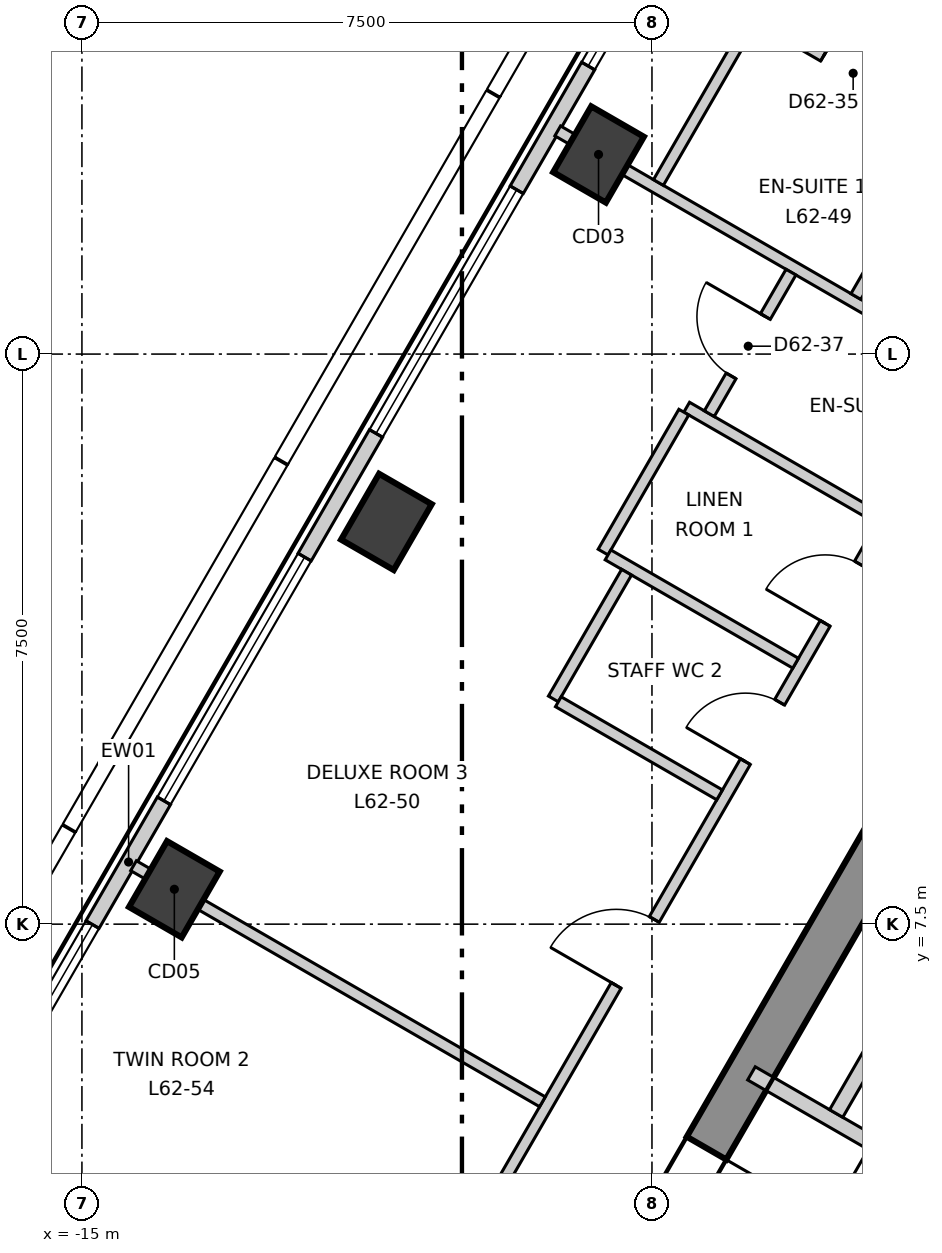
"""IFC4 building model, lengths in metres.
Left out: names, types, materials, properties, quantities, classifications, styles, units other than length and angle.
Written with IfcOpenShell. Run it as: python <this file> out.ifc"""

import sys

from ifc_helpers import new_model, si_unit, direction, frame, frame_2d, origin, origin_2d, place, context, subcontext, project, spatial, polyline, rectangle, outline, extrude, element, fill, save


model = new_model("IFC4")
c1 = context("Model", 3, precision=1e-05, world=origin(), true_north=direction((0.0, 1.0)))
c2 = subcontext(c1, "Body", "Model", "MODEL_VIEW")
j1 = project(units=[si_unit("LENGTHUNIT", "METRE"), si_unit("PLANEANGLEUNIT", "RADIAN")], contexts=[c1])
p1 = place(None, origin())
s1 = spatial("IfcSite", under=j1, at=p1, CompositionType="ELEMENT")
p2 = place(p1, origin())
s2 = spatial("IfcBuilding", under=s1, at=p2, CompositionType="ELEMENT")
p3 = place(p2, frame((0.0, 0.0, 268.3)))
s3 = spatial("IfcBuildingStorey", under=s2, at=p3, CompositionType="ELEMENT", Elevation=268.3)
p4 = place(p3, frame((-1.732, 13.3, -0.3), z_axis=(0.0, 0.0, 1.0), x_axis=(-0.500000539815, -0.866025092122, 0.0)))
e1 = element("IfcWall", 1, at=p4, inside=s3, PredefinedType="SHEAR", context=c2, shape_type="SweptSolid", body=[
    extrude(outline(polyline([(-0.173, -0.3), (1.795, -0.3), (3.763, -0.3), (5.732, -0.3), (7.7, -0.3), (9.668, -0.301), (11.637, -0.301), (13.605, -0.301), (15.573, -0.301), (17.542, -0.301), (19.51, -0.301), (21.478, -0.301), (21.131, 0.3), (19.226, 0.3), (17.321, 0.3), (15.415, 0.3), (13.51, 0.3), (11.605, 0.3), (9.699, 0.3), (7.794, 0.3), (5.889, 0.3), (3.984, 0.3), (2.078, 0.3), (0.173, 0.3), (-0.173, -0.3)])), origin(), (0.0, 0.0, 1.0), 3.6),
])
p5 = place(p4, frame((10.102, 0.0, 0.3)))
e2 = element("IfcOpeningElement", 2, at=p5, cuts=e1, PredefinedType="OPENING", context=c2, shape_type="SweptSolid", body=[
    extrude(rectangle(XDim=1.1, YDim=2.1, at=frame_2d((0.55, 1.05))), frame((0.0, 0.31, 0.0), z_axis=(0.0, -1.0, 0.0), x_axis=(1.0, 0.0, 0.0)), (0.0, 0.0, 1.0), 0.621),
])
p6 = place(p4, frame((16.378, 0.0, 0.3)))
e3 = element("IfcOpeningElement", 3, at=p6, cuts=e1, PredefinedType="OPENING", context=c2, shape_type="SweptSolid", body=[
    extrude(rectangle(XDim=0.9, YDim=2.1, at=frame_2d((0.45, 1.05))), frame((0.0, 0.31, 0.0), z_axis=(0.0, -1.0, 0.0), x_axis=(1.0, 0.0, 0.0)), (0.0, 0.0, 1.0), 0.621),
])
p7 = place(p4, frame((4.026, 0.0, 0.3)))
e4 = element("IfcOpeningElement", 4, at=p7, cuts=e1, PredefinedType="OPENING", context=c2, shape_type="SweptSolid", body=[
    extrude(rectangle(XDim=0.9, YDim=2.1, at=frame_2d((0.45, 1.05))), frame((0.0, 0.31, 0.0), z_axis=(0.0, -1.0, 0.0), x_axis=(1.0, 0.0, 0.0)), (0.0, 0.0, 1.0), 0.621),
])
for number, where, z_axis, x_axis in (
    (5, (-8.203, 17.626, -0.3), (0.0, 0.0, 1.0), (0.5, 0.866, 0.0)),
    (6, (-10.994, 12.792, -0.3), (0.0, 0.0, 1.0), (0.5, 0.866, 0.0)),
    (7, (-13.784, 7.959, -0.3), (0.0, 0.0, 1.0), (0.5, 0.866, 0.0)),
):
    element("IfcColumn", number, at=place(p3, frame(where, z_axis=z_axis, x_axis=x_axis)), inside=s3, PredefinedType="COLUMN", context=c2, shape_type="SweptSolid", body=[
        extrude(rectangle(XDim=1.0, YDim=0.8, at=origin_2d()), origin(), (0.0, 0.0, 1.0), 3.6),
    ])
p8 = place(p3, frame((-2.577, 28.771, 0.0), z_axis=(0.0, 0.0, 1.0), x_axis=(-0.49999909388, -0.866025926932, 0.0)))
e8 = element("IfcWall", 8, at=p8, inside=s3, PredefinedType="ELEMENTEDWALL", context=c2, shape_type="SweptSolid", body=[
    extrude(rectangle(XDim=47.236, YDim=0.2, at=frame_2d((23.618, 0.0))), origin(), (0.0, 0.0, 1.0), 3.3),
])
p9 = place(p8, frame((2.243, 0.0, 0.9)))
e9 = element("IfcOpeningElement", 9, at=p9, cuts=e8, PredefinedType="OPENING", context=c2, shape_type="SweptSolid", body=[
    extrude(rectangle(XDim=3.7, YDim=2.2, at=frame_2d((1.85, 1.1))), frame((0.0, 0.11, 0.0), z_axis=(0.0, -1.0, 0.0), x_axis=(1.0, 0.0, 0.0)), (0.0, 0.0, 1.0), 0.22),
])
p10 = place(p8, frame((7.824, 0.0, 0.9)))
e10 = element("IfcOpeningElement", 10, at=p10, cuts=e8, PredefinedType="OPENING", context=c2, shape_type="SweptSolid", body=[
    extrude(rectangle(XDim=3.7, YDim=2.2, at=frame_2d((1.85, 1.1))), frame((0.0, 0.11, 0.0), z_axis=(0.0, -1.0, 0.0), x_axis=(1.0, 0.0, 0.0)), (0.0, 0.0, 1.0), 0.22),
])
p11 = place(p8, frame((13.406, 0.0, 0.9)))
e11 = element("IfcOpeningElement", 11, at=p11, cuts=e8, PredefinedType="OPENING", context=c2, shape_type="SweptSolid", body=[
    extrude(rectangle(XDim=3.7, YDim=2.2, at=frame_2d((1.85, 1.1))), frame((0.0, 0.11, 0.0), z_axis=(0.0, -1.0, 0.0), x_axis=(1.0, 0.0, 0.0)), (0.0, 0.0, 1.0), 0.22),
])
p12 = place(p8, frame((18.987, 0.0, 0.9)))
e12 = element("IfcOpeningElement", 12, at=p12, cuts=e8, PredefinedType="OPENING", context=c2, shape_type="SweptSolid", body=[
    extrude(rectangle(XDim=3.7, YDim=2.2, at=frame_2d((1.85, 1.1))), frame((0.0, 0.11, 0.0), z_axis=(0.0, -1.0, 0.0), x_axis=(1.0, 0.0, 0.0)), (0.0, 0.0, 1.0), 0.22),
])
p13 = place(p8, frame((24.569, 0.0, 0.9)))
e13 = element("IfcOpeningElement", 13, at=p13, cuts=e8, PredefinedType="OPENING", context=c2, shape_type="SweptSolid", body=[
    extrude(rectangle(XDim=3.7, YDim=2.2, at=frame_2d((1.85, 1.1))), frame((0.0, 0.11, 0.0), z_axis=(0.0, -1.0, 0.0), x_axis=(1.0, 0.0, 0.0)), (0.0, 0.0, 1.0), 0.22),
])
p14 = place(p8, frame((30.15, 0.0, 0.9)))
e14 = element("IfcOpeningElement", 14, at=p14, cuts=e8, PredefinedType="OPENING", context=c2, shape_type="SweptSolid", body=[
    extrude(rectangle(XDim=3.7, YDim=2.2, at=frame_2d((1.85, 1.1))), frame((0.0, 0.11, 0.0), z_axis=(0.0, -1.0, 0.0), x_axis=(1.0, 0.0, 0.0)), (0.0, 0.0, 1.0), 0.22),
])
p15 = place(p8, frame((35.731, 0.0, 0.9)))
e15 = element("IfcOpeningElement", 15, at=p15, cuts=e8, PredefinedType="OPENING", context=c2, shape_type="SweptSolid", body=[
    extrude(rectangle(XDim=3.7, YDim=2.2, at=frame_2d((1.85, 1.1))), frame((0.0, 0.11, 0.0), z_axis=(0.0, -1.0, 0.0), x_axis=(1.0, 0.0, 0.0)), (0.0, 0.0, 1.0), 0.22),
])
p16 = place(p8, frame((41.313, 0.0, 0.9)))
e16 = element("IfcOpeningElement", 16, at=p16, cuts=e8, PredefinedType="OPENING", context=c2, shape_type="SweptSolid", body=[
    extrude(rectangle(XDim=3.7, YDim=2.2, at=frame_2d((1.85, 1.1))), frame((0.0, 0.11, 0.0), z_axis=(0.0, -1.0, 0.0), x_axis=(1.0, 0.0, 0.0)), (0.0, 0.0, 1.0), 0.22),
])
p17 = place(p3, frame((-17.678, -10.12, 0.0), z_axis=(0.0, 0.0, 1.0), x_axis=(0.49998824015, 0.86603219323, 0.0)))
e17 = element("IfcWall", 17, at=p17, inside=s3, PredefinedType="PARTITIONING", context=c2, shape_type="SweptSolid", body=[
    extrude(rectangle(XDim=35.357, YDim=0.15, at=frame_2d((17.678, 0.0))), origin(), (0.0, 0.0, 1.0), 3.3),
])
p18 = place(p17, frame((31.607, 0.0, 0.0)))
e18 = element("IfcOpeningElement", 18, at=p18, cuts=e17, PredefinedType="OPENING", context=c2, shape_type="SweptSolid", body=[
    extrude(rectangle(XDim=1.0, YDim=2.1, at=frame_2d((0.5, 1.05))), frame((0.0, 0.085, 0.0), z_axis=(0.0, -1.0, 0.0), x_axis=(1.0, 0.0, 0.0)), (0.0, 0.0, 1.0), 0.17),
])
p19 = place(p17, frame((19.416, 0.0, 0.0)))
e19 = element("IfcOpeningElement", 19, at=p19, cuts=e17, PredefinedType="OPENING", context=c2, shape_type="SweptSolid", body=[
    extrude(rectangle(XDim=1.0, YDim=2.1, at=frame_2d((0.5, 1.05))), frame((0.0, 0.085, 0.0), z_axis=(0.0, -1.0, 0.0), x_axis=(1.0, 0.0, 0.0)), (0.0, 0.0, 1.0), 0.17),
])
p20 = place(p17, frame((24.916, 0.0, 0.0)))
e20 = element("IfcOpeningElement", 20, at=p20, cuts=e17, PredefinedType="OPENING", context=c2, shape_type="SweptSolid", body=[
    extrude(rectangle(XDim=0.9, YDim=2.1, at=frame_2d((0.45, 1.05))), frame((0.0, 0.085, 0.0), z_axis=(0.0, -1.0, 0.0), x_axis=(1.0, 0.0, 0.0)), (0.0, 0.0, 1.0), 0.17),
])
p21 = place(p17, frame((22.816, 0.0, 0.0)))
e21 = element("IfcOpeningElement", 21, at=p21, cuts=e17, PredefinedType="OPENING", context=c2, shape_type="SweptSolid", body=[
    extrude(rectangle(XDim=0.9, YDim=2.1, at=frame_2d((0.45, 1.05))), frame((0.0, 0.085, 0.0), z_axis=(0.0, -1.0, 0.0), x_axis=(1.0, 0.0, 0.0)), (0.0, 0.0, 1.0), 0.17),
])
p22 = place(p17, frame((14.654, 0.0, 0.0)))
e22 = element("IfcOpeningElement", 22, at=p22, cuts=e17, PredefinedType="OPENING", context=c2, shape_type="SweptSolid", body=[
    extrude(rectangle(XDim=1.0, YDim=2.1, at=frame_2d((0.5, 1.05))), frame((0.0, 0.085, 0.0), z_axis=(0.0, -1.0, 0.0), x_axis=(1.0, 0.0, 0.0)), (0.0, 0.0, 1.0), 0.17),
])
p23 = place(p17, frame((7.672, 0.0, 0.0)))
e23 = element("IfcOpeningElement", 23, at=p23, cuts=e17, PredefinedType="OPENING", context=c2, shape_type="SweptSolid", body=[
    extrude(rectangle(XDim=1.0, YDim=2.1, at=frame_2d((0.5, 1.05))), frame((0.0, 0.085, 0.0), z_axis=(0.0, -1.0, 0.0), x_axis=(1.0, 0.0, 0.0)), (0.0, 0.0, 1.0), 0.17),
])
p24 = place(p17, frame((2.69, 0.0, 0.0)))
e24 = element("IfcOpeningElement", 24, at=p24, cuts=e17, PredefinedType="OPENING", context=c2, shape_type="SweptSolid", body=[
    extrude(rectangle(XDim=1.0, YDim=2.1, at=frame_2d((0.5, 1.05))), frame((0.0, 0.085, 0.0), z_axis=(0.0, -1.0, 0.0), x_axis=(1.0, 0.0, 0.0)), (0.0, 0.0, 1.0), 0.17),
])
p25 = place(p3, frame((-14.321, 8.269, 0.0), z_axis=(0.0, 0.0, 1.0), x_axis=(0.866043575568, -0.499968524226, 0.0)))
e25 = element("IfcWall", 25, at=p25, inside=s3, PredefinedType="PARTITIONING", context=c2, shape_type="SweptSolid", body=[
    extrude(rectangle(XDim=6.212, YDim=0.15, at=frame_2d((3.106, 0.0))), origin(), (0.0, 0.0, 1.0), 2.8),
])
p26 = place(p3, frame((-8.74, 17.936, 0.0), z_axis=(0.0, 0.0, 1.0), x_axis=(0.866033751423, -0.499985541187, 0.0)))
e26 = element("IfcWall", 26, at=p26, inside=s3, PredefinedType="PARTITIONING", context=c2, shape_type="SweptSolid", body=[
    extrude(rectangle(XDim=6.212, YDim=0.15, at=frame_2d((3.106, 0.0))), origin(), (0.0, 0.0, 1.0), 3.3),
])
p27 = place(p3, frame((-7.043, 14.301, 0.0), z_axis=(0.0, 0.0, 1.0), x_axis=(0.865917290158, -0.500187211558, 0.0)))
e27 = element("IfcWall", 27, at=p27, inside=s3, PredefinedType="PARTITIONING", context=c2, shape_type="SweptSolid", body=[
    extrude(rectangle(XDim=2.925, YDim=0.15, at=frame_2d((1.463, 0.0))), origin(), (0.0, 0.0, 1.0), 3.3),
])
p28 = place(p3, frame((-8.143, 12.395, 0.0), z_axis=(0.0, 0.0, 1.0), x_axis=(0.499672732084, 0.866214269573, 0.0)))
e28 = element("IfcWall", 28, at=p28, inside=s3, PredefinedType="PARTITIONING", context=c2, shape_type="SweptSolid", body=[
    extrude(rectangle(XDim=2.125, YDim=0.15, at=frame_2d((1.063, 0.0))), origin(), (0.0, 0.0, 1.0), 3.3),
])
p29 = place(p3, frame((-8.078, 12.358, 0.0), z_axis=(0.0, 0.0, 1.0), x_axis=(0.866020080793, -0.500009219579, 0.0)))
e29 = element("IfcWall", 29, at=p29, inside=s3, PredefinedType="PARTITIONING", context=c2, shape_type="SweptSolid", body=[
    extrude(rectangle(XDim=2.85, YDim=0.15, at=frame_2d((1.425, 0.0))), origin(), (0.0, 0.0, 1.0), 3.3),
])
p30 = place(p3, frame((-8.797, 10.463, 0.0), z_axis=(0.0, 0.0, 1.0), x_axis=(0.500271259635, 0.865868735308, 0.0)))
e30 = element("IfcWall", 30, at=p30, inside=s3, PredefinedType="PARTITIONING", context=c2, shape_type="SweptSolid", body=[
    extrude(rectangle(XDim=1.925, YDim=0.15, at=frame_2d((0.963, 0.0))), origin(), (0.0, 0.0, 1.0), 3.3),
])
p31 = place(p3, frame((-8.732, 10.426, 0.0), z_axis=(0.0, 0.0, 1.0), x_axis=(0.866014668023, -0.500018594424, 0.0)))
e31 = element("IfcWall", 31, at=p31, inside=s3, PredefinedType="PARTITIONING", context=c2, shape_type="SweptSolid", body=[
    extrude(rectangle(XDim=2.45, YDim=0.15, at=frame_2d((1.225, 0.0))), origin(), (0.0, 0.0, 1.0), 3.3),
])
for number, where, z_axis, x_axis in (
    (32, (-4.817, 15.757, 0.0), (0.0, 0.0, 1.0), (0.5, 0.866, 0.0)),
    (33, (-7.415, 17.257, 0.0), (0.0, 0.0, 1.0), (0.5, 0.866, 0.0)),
):
    element("IfcWall", number, at=place(p3, frame(where, z_axis=z_axis, x_axis=x_axis)), inside=s3, PredefinedType="PARTITIONING", context=c2, shape_type="SweptSolid", body=[
        extrude(rectangle(XDim=2.525, YDim=0.15, at=frame_2d((1.263, 0.0))), origin(), (0.0, 0.0, 1.0), 3.3),
    ])
p32 = place(p3, frame((-6.746, 14.216, 0.0), z_axis=(0.0, 0.0, 1.0), x_axis=(0.500095966228, 0.865969990567, 0.0)))
e34 = element("IfcWall", 34, at=p32, inside=s3, PredefinedType="PARTITIONING", context=c2, shape_type="SweptSolid", body=[
    extrude(rectangle(XDim=2.15, YDim=0.15, at=frame_2d((1.075, 0.0))), origin(), (0.0, 0.0, 1.0), 3.3),
])
p33 = place(p32, frame((0.575, 0.0, 0.0)))
e35 = element("IfcOpeningElement", 35, at=p33, cuts=e34, PredefinedType="OPENING", context=c2, shape_type="SweptSolid", body=[
    extrude(rectangle(XDim=0.9, YDim=2.1, at=frame_2d((0.45, 1.05))), frame((0.0, 0.085, 0.0), z_axis=(0.0, -1.0, 0.0), x_axis=(1.0, 0.0, 0.0)), (0.0, 0.0, 1.0), 0.17),
])
p34 = place(p3, frame((-6.087, 19.407, 0.0), z_axis=(0.0, 0.0, 1.0), x_axis=(0.866004402611, -0.500036373335, 0.0)))
e36 = element("IfcWall", 36, at=p34, inside=s3, PredefinedType="PARTITIONING", context=c2, shape_type="SweptSolid", body=[
    extrude(rectangle(XDim=2.85, YDim=0.15, at=frame_2d((1.425, 0.0))), origin(), (0.0, 0.0, 1.0), 3.3),
])
p35 = place(p34, frame((0.975, 0.0, 0.0)))
e37 = element("IfcOpeningElement", 37, at=p35, cuts=e36, PredefinedType="OPENING", context=c2, shape_type="SweptSolid", body=[
    extrude(rectangle(XDim=0.9, YDim=2.1, at=frame_2d((0.45, 1.05))), frame((0.0, 0.085, 0.0), z_axis=(0.0, -1.0, 0.0), x_axis=(1.0, 0.0, 0.0)), (0.0, 0.0, 1.0), 0.17),
])
p36 = place(p3, frame((-6.191, 5.537, 0.0), z_axis=(0.0, 0.0, 1.0), x_axis=(0.866052607023, -0.499952879648, 0.0)))
e38 = element("IfcWall", 38, at=p36, inside=s3, PredefinedType="SOLIDWALL", context=c2, shape_type="SweptSolid", body=[
    extrude(rectangle(XDim=3.332, YDim=0.2, at=frame_2d((1.666, 0.0))), origin(), (0.0, 0.0, 1.0), 3.3),
])
p37 = place(p36, frame((1.83, 0.0, 0.0)))
e39 = element("IfcOpeningElement", 39, at=p37, cuts=e38, PredefinedType="OPENING", context=c2, shape_type="SweptSolid", body=[
    extrude(rectangle(XDim=0.9, YDim=2.1, at=frame_2d((0.45, 1.05))), frame((0.0, 0.11, 0.0), z_axis=(0.0, -1.0, 0.0), x_axis=(1.0, 0.0, 0.0)), (0.0, 0.0, 1.0), 0.22),
])
p38 = place(p3, frame((-5.076, 5.009, 0.0), z_axis=(0.0, 0.0, 1.0), x_axis=(0.50002537861, 0.866010750942, 0.0)))
e40 = element("IfcWall", 40, at=p38, inside=s3, PredefinedType="SOLIDWALL", context=c2, shape_type="SweptSolid", body=[
    extrude(rectangle(XDim=3.0, YDim=0.2, at=frame_2d((1.5, 0.0))), origin(), (0.0, 0.0, 1.0), 3.3),
])
p39 = place(p10, origin())
e41 = element("IfcWindow", 41, at=p39, inside=s3, PartitioningType="SINGLE_PANEL", PredefinedType="WINDOW", context=c2, shape_type="SweptSolid", body=[
    extrude(rectangle(XDim=3.7, YDim=2.2, at=frame_2d((1.85, 1.1))), frame((0.0, 0.03, 0.0), z_axis=(0.0, -1.0, 0.0), x_axis=(1.0, 0.0, 0.0)), (0.0, 0.0, 1.0), 0.06),
])
fill(e10, e41)
p40 = place(p11, origin())
e42 = element("IfcWindow", 42, at=p40, inside=s3, PartitioningType="SINGLE_PANEL", PredefinedType="WINDOW", context=c2, shape_type="SweptSolid", body=[
    extrude(rectangle(XDim=3.7, YDim=2.2, at=frame_2d((1.85, 1.1))), frame((0.0, 0.03, 0.0), z_axis=(0.0, -1.0, 0.0), x_axis=(1.0, 0.0, 0.0)), (0.0, 0.0, 1.0), 0.06),
])
fill(e11, e42)
p41 = place(p12, origin())
e43 = element("IfcWindow", 43, at=p41, inside=s3, PartitioningType="SINGLE_PANEL", PredefinedType="WINDOW", context=c2, shape_type="SweptSolid", body=[
    extrude(rectangle(XDim=3.7, YDim=2.2, at=frame_2d((1.85, 1.1))), frame((0.0, 0.03, 0.0), z_axis=(0.0, -1.0, 0.0), x_axis=(1.0, 0.0, 0.0)), (0.0, 0.0, 1.0), 0.06),
])
fill(e12, e43)
p42 = place(p13, origin())
e44 = element("IfcWindow", 44, at=p42, inside=s3, PartitioningType="SINGLE_PANEL", PredefinedType="WINDOW", context=c2, shape_type="SweptSolid", body=[
    extrude(rectangle(XDim=3.7, YDim=2.2, at=frame_2d((1.85, 1.1))), frame((0.0, 0.03, 0.0), z_axis=(0.0, -1.0, 0.0), x_axis=(1.0, 0.0, 0.0)), (0.0, 0.0, 1.0), 0.06),
])
fill(e13, e44)
p43 = place(p35, origin())
e45 = element("IfcDoor", 45, at=p43, inside=s3, OperationType="SINGLE_SWING_RIGHT", PredefinedType="DOOR", context=c2, shape_type="SweptSolid", body=[
    extrude(rectangle(XDim=0.9, YDim=2.1, at=frame_2d((0.45, 1.05))), frame((0.0, 0.025, 0.0), z_axis=(0.0, -1.0, 0.0), x_axis=(1.0, 0.0, 0.0)), (0.0, 0.0, 1.0), 0.05),
])
fill(e37, e45)
p44 = place(p19, origin())
e46 = element("IfcDoor", 46, at=p44, inside=s3, OperationType="SINGLE_SWING_RIGHT", PredefinedType="DOOR", context=c2, shape_type="SweptSolid", body=[
    extrude(rectangle(XDim=1.0, YDim=2.1, at=frame_2d((0.5, 1.05))), frame((0.0, 0.025, 0.0), z_axis=(0.0, -1.0, 0.0), x_axis=(1.0, 0.0, 0.0)), (0.0, 0.0, 1.0), 0.05),
])
fill(e19, e46)
p45 = place(p33, origin())
e47 = element("IfcDoor", 47, at=p45, inside=s3, OperationType="SINGLE_SWING_LEFT", PredefinedType="DOOR", context=c2, shape_type="SweptSolid", body=[
    extrude(rectangle(XDim=0.9, YDim=2.1, at=frame_2d((0.45, 1.05))), frame((0.0, 0.025, 0.0), z_axis=(0.0, -1.0, 0.0), x_axis=(1.0, 0.0, 0.0)), (0.0, 0.0, 1.0), 0.05),
])
fill(e35, e47)
p46 = place(p20, origin())
e48 = element("IfcDoor", 48, at=p46, inside=s3, OperationType="SINGLE_SWING_RIGHT", PredefinedType="DOOR", context=c2, shape_type="SweptSolid", body=[
    extrude(rectangle(XDim=0.9, YDim=2.1, at=frame_2d((0.45, 1.05))), frame((0.0, 0.025, 0.0), z_axis=(0.0, -1.0, 0.0), x_axis=(1.0, 0.0, 0.0)), (0.0, 0.0, 1.0), 0.05),
])
fill(e20, e48)
p47 = place(p21, origin())
e49 = element("IfcDoor", 49, at=p47, inside=s3, OperationType="SINGLE_SWING_RIGHT", PredefinedType="DOOR", context=c2, shape_type="SweptSolid", body=[
    extrude(rectangle(XDim=0.9, YDim=2.1, at=frame_2d((0.45, 1.05))), frame((0.0, 0.025, 0.0), z_axis=(0.0, -1.0, 0.0), x_axis=(1.0, 0.0, 0.0)), (0.0, 0.0, 1.0), 0.05),
])
fill(e21, e49)
p48 = place(p5, origin())
e50 = element("IfcDoor", 50, at=p48, inside=s3, OperationType="SINGLE_SWING_RIGHT", PredefinedType="DOOR", context=c2, shape_type="SweptSolid", body=[
    extrude(rectangle(XDim=1.1, YDim=2.1, at=frame_2d((0.55, 1.05))), frame((0.0, 0.025, 0.0), z_axis=(0.0, -1.0, 0.0), x_axis=(1.0, 0.0, 0.0)), (0.0, 0.0, 1.0), 0.05),
])
fill(e2, e50)
save(model, sys.argv[1])
